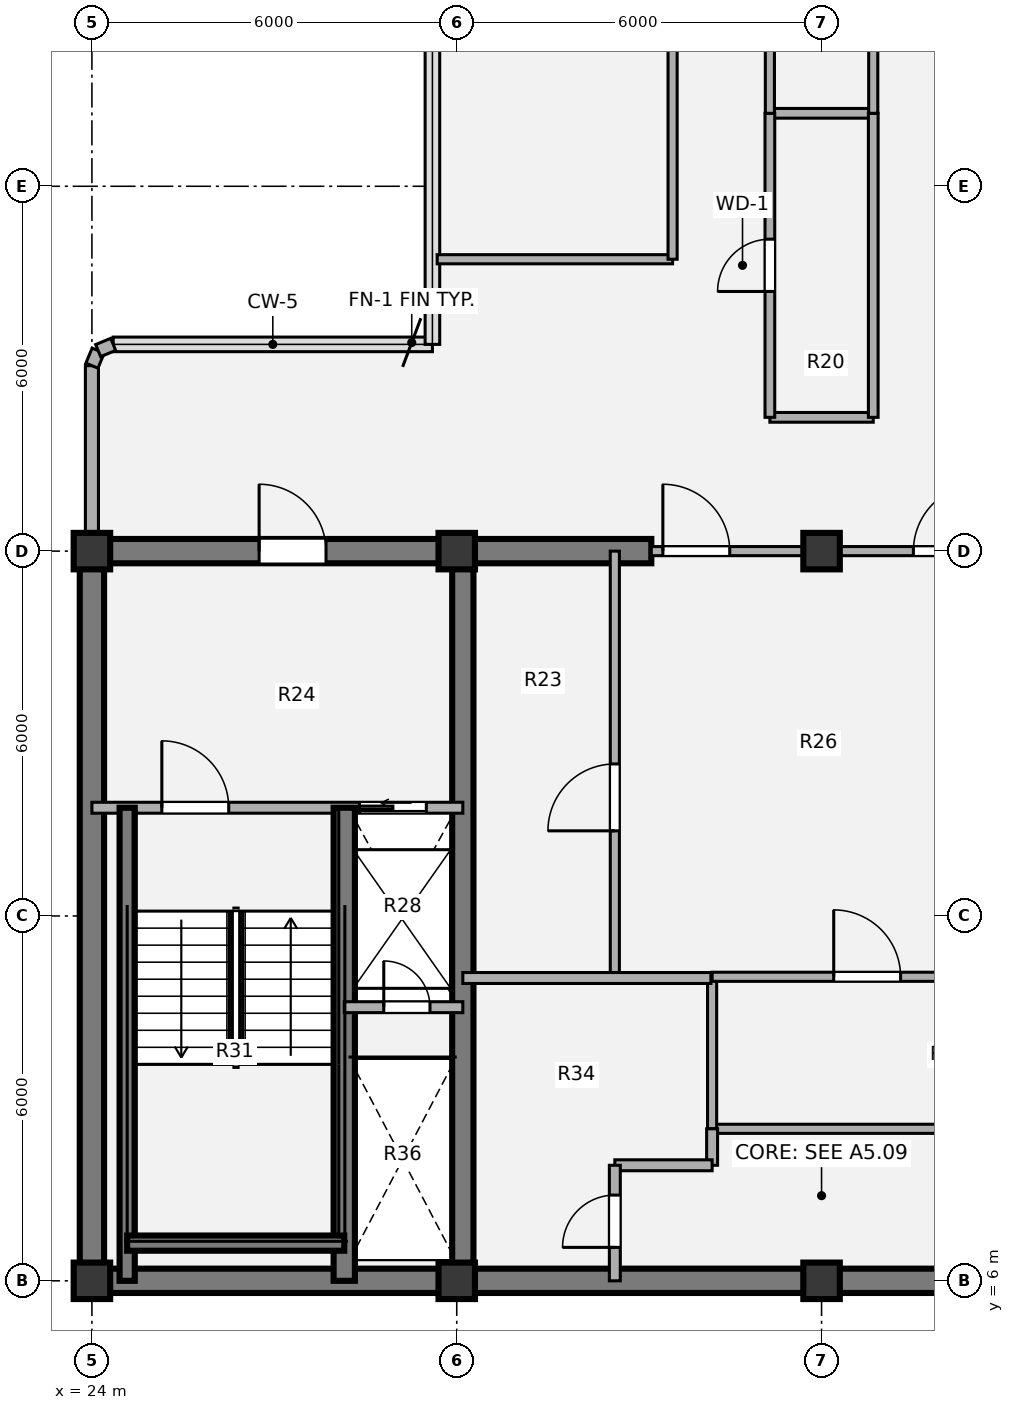
"""IFC4 building model, lengths in metres.
Left out: names, types, materials, properties, quantities, classifications, styles, units other than length and angle.
Written with IfcOpenShell. Run it as: python <this file> out.ifc"""

import sys

from ifc_helpers import new_model, si_unit, direction, frame, frame_2d, origin, origin_2d, place, context, subcontext, project, spatial, rectangle, extrude, source, transform, mapped, element, fill, save


model = new_model("IFC4")
c1 = context("Model", 3, precision=1e-05, world=origin(), true_north=direction((0.0, 1.0)))
c2 = subcontext(c1, "Body", "Model", "MODEL_VIEW")
j1 = project(units=[si_unit("LENGTHUNIT", "METRE"), si_unit("PLANEANGLEUNIT", "RADIAN")], contexts=[c1])
p1 = place(None, origin())
s1 = spatial("IfcSite", under=j1, at=p1, CompositionType="ELEMENT")
p2 = place(p1, origin())
s2 = spatial("IfcBuilding", under=s1, at=p2, CompositionType="ELEMENT")
p3 = place(p2, frame((0.0, 0.0, 272.16)))
s3 = spatial("IfcBuildingStorey", under=s2, at=p3, CompositionType="ELEMENT", Elevation=272.16)
m1 = source(origin(), c2, "Body", "SweptSolid", [
    extrude(rectangle(XDim=0.6, YDim=0.6, at=origin_2d()), origin(), (0.0, 0.0, 1.0), 3.78),
])
for number, where, z_axis, x_axis in (
    (1, (24.0, 6.0, 0.0), (0.0, 0.0, 1.0), (1.0, 0.0, 0.0)),
    (2, (30.0, 6.0, 0.0), (0.0, 0.0, 1.0), (1.0, 0.0, 0.0)),
    (3, (36.0, 6.0, 0.0), (0.0, 0.0, 1.0), (1.0, 0.0, 0.0)),
    (4, (24.0, 18.0, 0.0), (0.0, 0.0, 1.0), (1.0, 0.0, 0.0)),
    (5, (30.0, 18.0, 0.0), (0.0, 0.0, 1.0), (1.0, 0.0, 0.0)),
    (6, (36.0, 18.0, 0.0), (0.0, 0.0, 1.0), (1.0, 0.0, 0.0)),
):
    element("IfcColumn", number, at=place(p3, frame(where, z_axis=z_axis, x_axis=x_axis)), inside=s3, PredefinedType="COLUMN", context=c2, shape_type="MappedRepresentation", body=[
        mapped(m1, transform((0.0, 0.0, 0.0), x_axis=(1.0, 0.0, 0.0), y_axis=(0.0, 1.0, 0.0), z_axis=(0.0, 0.0, 1.0), scale=1.0)),
    ])
p4 = place(p3, frame((48.2, 6.0, 0.0), z_axis=(0.0, 0.0, 1.0), x_axis=(-1.0, 0.0, 0.0)))
e7 = element("IfcWall", 7, at=p4, inside=s3, PredefinedType="SHEAR", context=c2, shape_type="SweptSolid", body=[
    extrude(rectangle(XDim=24.4, YDim=0.4, at=frame_2d((12.2, 0.0))), origin(), (0.0, 0.0, 1.0), 3.78),
])
p5 = place(p3, frame((24.0, 6.0, 0.0), z_axis=(0.0, 0.0, 1.0), x_axis=(0.0, 1.0, 0.0)))
e8 = element("IfcWall", 8, at=p5, inside=s3, PredefinedType="SHEAR", context=c2, shape_type="SweptSolid", body=[
    extrude(rectangle(XDim=12.0, YDim=0.4, at=frame_2d((6.0, 0.0))), origin(), (0.0, 0.0, 1.0), 3.78),
])
p6 = place(p3, frame((23.8, 18.0, 0.0), z_axis=(0.0, 0.0, 1.0), x_axis=(1.0, 0.0, 0.0)))
e9 = element("IfcWall", 9, at=p6, inside=s3, PredefinedType="SHEAR", context=c2, shape_type="SweptSolid", body=[
    extrude(rectangle(XDim=9.4, YDim=0.4, at=frame_2d((4.7, 0.0))), origin(), (0.0, 0.0, 1.0), 3.78),
])
p7 = place(p6, frame((2.95, 0.0, 0.0)))
e10 = element("IfcOpeningElement", 10, at=p7, cuts=e9, PredefinedType="OPENING", context=c2, shape_type="SweptSolid", body=[
    extrude(rectangle(XDim=1.1, YDim=2.1, at=origin_2d()), frame((0.55, 0.21, 1.05), z_axis=(0.0, -1.0, 0.0), x_axis=(1.0, 0.0, 0.0)), (0.0, 0.0, 1.0), 0.42),
])
p8 = place(p3, frame((30.1, 6.0, 0.0), z_axis=(0.0, 0.0, 1.0), x_axis=(0.0, 1.0, 0.0)))
e11 = element("IfcWall", 11, at=p8, inside=s3, PredefinedType="SHEAR", context=c2, shape_type="SweptSolid", body=[
    extrude(rectangle(XDim=12.0, YDim=0.35, at=frame_2d((6.0, 0.0))), origin(), (0.0, 0.0, 1.0), 3.78),
])
p9 = place(p3, frame((24.0, 18.28, 0.0), z_axis=(0.0, 0.0, 1.0), x_axis=(0.0, 1.0, 0.0)))
e12 = element("IfcWall", 12, at=p9, inside=s3, PredefinedType="SOLIDWALL", context=c2, shape_type="SweptSolid", body=[
    extrude(rectangle(XDim=2.77, YDim=0.215, at=frame_2d((1.385, 0.0))), origin(), (0.0, 0.0, 1.0), 2.718),
])
p10 = place(p3, frame((24.0, 21.05, 0.0), z_axis=(0.0, 0.0, 1.0), x_axis=(0.382673670509, 0.923883575944, 0.0)))
e13 = element("IfcWall", 13, at=p10, inside=s3, PredefinedType="SOLIDWALL", context=c2, shape_type="SweptSolid", body=[
    extrude(rectangle(XDim=0.268, YDim=0.215, at=frame_2d((0.134, 0.0))), origin(), (0.0, 0.0, 1.0), 3.53),
])
p11 = place(p3, frame((24.103, 21.298, 0.0), z_axis=(0.0, 0.0, 1.0), x_axis=(0.924205486139, 0.381895560841, 0.0)))
e14 = element("IfcWall", 14, at=p11, inside=s3, PredefinedType="SOLIDWALL", context=c2, shape_type="SweptSolid", body=[
    extrude(rectangle(XDim=0.268, YDim=0.215, at=frame_2d((0.134, 0.0))), origin(), (0.0, 0.0, 1.0), 3.53),
])
p12 = place(p3, frame((32.6, 11.0, 0.0), z_axis=(0.0, 0.0, 1.0), x_axis=(0.0, 1.0, 0.0)))
e15 = element("IfcWall", 15, at=p12, inside=s3, PredefinedType="PARTITIONING", context=c2, shape_type="SweptSolid", body=[
    extrude(rectangle(XDim=7.0, YDim=0.15, at=frame_2d((3.5, 0.0))), origin(), (0.0, 0.0, 1.0), 3.5),
])
p13 = place(p12, frame((2.4, 0.0, 0.0)))
e16 = element("IfcOpeningElement", 16, at=p13, cuts=e15, PredefinedType="OPENING", context=c2, shape_type="SweptSolid", body=[
    extrude(rectangle(XDim=1.1, YDim=2.1, at=origin_2d()), frame((0.55, 0.085, 1.05), z_axis=(0.0, -1.0, 0.0), x_axis=(1.0, 0.0, 0.0)), (0.0, 0.0, 1.0), 0.17),
])
p14 = place(p3, frame((34.2, 8.5, 0.0), z_axis=(0.0, 0.0, 1.0), x_axis=(1.0, 0.0, 0.0)))
e17 = element("IfcWall", 17, at=p14, inside=s3, PredefinedType="PARTITIONING", context=c2, shape_type="SweptSolid", body=[
    extrude(rectangle(XDim=5.15, YDim=0.15, at=frame_2d((2.575, 0.0))), origin(), (0.0, 0.0, 1.0), 3.5),
])
p15 = place(p3, frame((34.2, 8.5, 0.0), z_axis=(0.0, 0.0, 1.0), x_axis=(0.0, 1.0, 0.0)))
e18 = element("IfcWall", 18, at=p15, inside=s3, PredefinedType="PARTITIONING", context=c2, shape_type="SweptSolid", body=[
    extrude(rectangle(XDim=2.5, YDim=0.15, at=frame_2d((1.25, 0.0))), origin(), (0.0, 0.0, 1.0), 3.5),
])
p16 = place(p3, frame((34.2, 11.0, 0.0), z_axis=(0.0, 0.0, 1.0), x_axis=(1.0, 0.0, 0.0)))
e19 = element("IfcWall", 19, at=p16, inside=s3, PredefinedType="PARTITIONING", context=c2, shape_type="SweptSolid", body=[
    extrude(rectangle(XDim=5.15, YDim=0.15, at=frame_2d((2.575, 0.0))), origin(), (0.0, 0.0, 1.0), 3.5),
])
p17 = place(p16, frame((2.0, 0.0, 0.0)))
e20 = element("IfcOpeningElement", 20, at=p17, cuts=e19, PredefinedType="OPENING", context=c2, shape_type="SweptSolid", body=[
    extrude(rectangle(XDim=1.1, YDim=2.1, at=origin_2d()), frame((0.55, 0.085, 1.05), z_axis=(0.0, -1.0, 0.0), x_axis=(1.0, 0.0, 0.0)), (0.0, 0.0, 1.0), 0.17),
])
p18 = place(p3, frame((30.1, 10.98, 0.0), z_axis=(0.0, 0.0, 1.0), x_axis=(1.0, 0.0, 0.0)))
e21 = element("IfcWall", 21, at=p18, inside=s3, PredefinedType="PARTITIONING", context=c2, shape_type="SweptSolid", body=[
    extrude(rectangle(XDim=4.08, YDim=0.18, at=frame_2d((2.04, 0.0))), origin(), (0.0, 0.0, 1.0), 3.5),
])
p19 = place(p3, frame((34.2, 7.9, 0.0), z_axis=(0.0, 0.0, 1.0), x_axis=(0.0, 1.0, 0.0)))
e22 = element("IfcWall", 22, at=p19, inside=s3, PredefinedType="PARTITIONING", context=c2, shape_type="SweptSolid", body=[
    extrude(rectangle(XDim=0.6, YDim=0.18, at=frame_2d((0.3, 0.0))), origin(), (0.0, 0.0, 1.0), 3.5),
])
p20 = place(p3, frame((32.6, 7.9, 0.0), z_axis=(0.0, 0.0, 1.0), x_axis=(1.0, 0.0, 0.0)))
e23 = element("IfcWall", 23, at=p20, inside=s3, PredefinedType="PARTITIONING", context=c2, shape_type="SweptSolid", body=[
    extrude(rectangle(XDim=1.6, YDim=0.18, at=frame_2d((0.8, 0.0))), origin(), (0.0, 0.0, 1.0), 3.5),
])
p21 = place(p3, frame((32.6, 6.0, 0.0), z_axis=(0.0, 0.0, 1.0), x_axis=(0.0, 1.0, 0.0)))
e24 = element("IfcWall", 24, at=p21, inside=s3, PredefinedType="PARTITIONING", context=c2, shape_type="SweptSolid", body=[
    extrude(rectangle(XDim=1.9, YDim=0.18, at=frame_2d((0.95, 0.0))), origin(), (0.0, 0.0, 1.0), 3.5),
])
p22 = place(p21, frame((0.55, 0.0, 0.0)))
e25 = element("IfcOpeningElement", 25, at=p22, cuts=e24, PredefinedType="OPENING", context=c2, shape_type="SweptSolid", body=[
    extrude(rectangle(XDim=0.86, YDim=2.1, at=origin_2d()), frame((0.43, 0.1, 1.05), z_axis=(0.0, -1.0, 0.0), x_axis=(1.0, 0.0, 0.0)), (0.0, 0.0, 1.0), 0.2),
])
p23 = place(p3, frame((33.2, 18.0, 0.0), z_axis=(0.0, 0.0, 1.0), x_axis=(1.0, 0.0, 0.0)))
e26 = element("IfcWall", 26, at=p23, inside=s3, PredefinedType="PARTITIONING", context=c2, shape_type="SweptSolid", body=[
    extrude(rectangle(XDim=5.6, YDim=0.15, at=frame_2d((2.8, 0.0))), origin(), (0.0, 0.0, 1.0), 2.515),
])
p24 = place(p23, frame((0.19, 0.0, 0.0)))
e27 = element("IfcOpeningElement", 27, at=p24, cuts=e26, PredefinedType="OPENING", context=c2, shape_type="SweptSolid", body=[
    extrude(rectangle(XDim=1.1, YDim=2.1, at=origin_2d()), frame((0.55, 0.085, 1.05), z_axis=(0.0, -1.0, 0.0), x_axis=(1.0, 0.0, 0.0)), (0.0, 0.0, 1.0), 0.17),
])
p25 = place(p23, frame((4.31, 0.0, 0.0)))
e28 = element("IfcOpeningElement", 28, at=p25, cuts=e26, PredefinedType="OPENING", context=c2, shape_type="SweptSolid", body=[
    extrude(rectangle(XDim=1.1, YDim=2.1, at=origin_2d()), frame((0.55, 0.085, 1.05), z_axis=(0.0, -1.0, 0.0), x_axis=(1.0, 0.0, 0.0)), (0.0, 0.0, 1.0), 0.17),
])
p26 = place(p3, frame((24.0, 13.78, 0.0), z_axis=(0.0, 0.0, 1.0), x_axis=(1.0, 0.0, 0.0)))
e29 = element("IfcWall", 29, at=p26, inside=s3, PredefinedType="PARTITIONING", context=c2, shape_type="SweptSolid", body=[
    extrude(rectangle(XDim=6.1, YDim=0.18, at=frame_2d((3.05, 0.0))), origin(), (0.0, 0.0, 1.0), 3.5),
])
p27 = place(p26, frame((1.15, 0.0, 0.0)))
e30 = element("IfcOpeningElement", 30, at=p27, cuts=e29, PredefinedType="OPENING", context=c2, shape_type="SweptSolid", body=[
    extrude(rectangle(XDim=1.1, YDim=2.1, at=origin_2d()), frame((0.55, 0.1, 1.05), z_axis=(0.0, -1.0, 0.0), x_axis=(1.0, 0.0, 0.0)), (0.0, 0.0, 1.0), 0.2),
])
p28 = place(p26, frame((4.4, 0.0, 0.0)))
e31 = element("IfcOpeningElement", 31, at=p28, cuts=e29, PredefinedType="OPENING", context=c2, shape_type="SweptSolid", body=[
    extrude(rectangle(XDim=1.1, YDim=2.1, at=origin_2d()), frame((0.55, 0.1, 1.05), z_axis=(0.0, -1.0, 0.0), x_axis=(1.0, 0.0, 0.0)), (0.0, 0.0, 1.0), 0.2),
])
p29 = place(p3, frame((28.15, 6.0, 0.0), z_axis=(0.0, 0.0, 1.0), x_axis=(0.0, 1.0, 0.0)))
e32 = element("IfcWall", 32, at=p29, inside=s3, PredefinedType="SHEAR", context=c2, shape_type="SweptSolid", body=[
    extrude(rectangle(XDim=7.78, YDim=0.35, at=frame_2d((3.89, 0.0))), origin(), (0.0, 0.0, 1.0), 3.85),
])
p30 = place(p3, frame((24.58, 6.0, 0.0), z_axis=(0.0, 0.0, 1.0), x_axis=(0.0, 1.0, 0.0)))
e33 = element("IfcWall", 33, at=p30, inside=s3, PredefinedType="SHEAR", context=c2, shape_type="SweptSolid", body=[
    extrude(rectangle(XDim=7.78, YDim=0.25, at=frame_2d((3.89, 0.0))), origin(), (0.0, 0.0, 1.0), 3.85),
])
p31 = place(p3, frame((24.58, 6.62, 0.0), z_axis=(0.0, 0.0, 1.0), x_axis=(1.0, 0.0, 0.0)))
e34 = element("IfcWall", 34, at=p31, inside=s3, PredefinedType="SHEAR", context=c2, shape_type="SweptSolid", body=[
    extrude(rectangle(XDim=3.57, YDim=0.25, at=frame_2d((1.785, 0.0))), origin(), (0.0, 0.0, 1.0), 3.85),
])
p32 = place(p3, frame((28.15, 10.5, 0.0), z_axis=(0.0, 0.0, 1.0), x_axis=(1.0, 0.0, 0.0)))
e35 = element("IfcWall", 35, at=p32, inside=s3, PredefinedType="PARTITIONING", context=c2, shape_type="SweptSolid", body=[
    extrude(rectangle(XDim=1.95, YDim=0.18, at=frame_2d((0.975, 0.0))), origin(), (0.0, 0.0, 1.0), 3.5),
])
p33 = place(p32, frame((0.65, 0.0, 0.0)))
e36 = element("IfcOpeningElement", 36, at=p33, cuts=e35, PredefinedType="OPENING", context=c2, shape_type="SweptSolid", body=[
    extrude(rectangle(XDim=0.76, YDim=2.05, at=origin_2d()), frame((0.38, 0.1, 1.025), z_axis=(0.0, -1.0, 0.0), x_axis=(1.0, 0.0, 0.0)), (0.0, 0.0, 1.0), 0.2),
])
p34 = place(p3, frame((35.15, 20.2, 0.0), z_axis=(0.0, 0.0, 1.0), x_axis=(1.0, 0.0, 0.0)))
e37 = element("IfcWall", 37, at=p34, inside=s3, PredefinedType="PLUMBINGWALL", context=c2, shape_type="SweptSolid", body=[
    extrude(rectangle(XDim=1.7, YDim=0.16, at=frame_2d((0.85, 0.0))), origin(), (0.0, 0.0, 1.0), 3.5),
])
p35 = place(p3, frame((29.678, 22.8, 0.0), z_axis=(0.0, 0.0, 1.0), x_axis=(1.0, 0.0, 0.0)))
e38 = element("IfcWall", 38, at=p35, inside=s3, PredefinedType="PARTITIONING", context=c2, shape_type="SweptSolid", body=[
    extrude(rectangle(XDim=3.872, YDim=0.15, at=frame_2d((1.936, 0.0))), origin(), (0.0, 0.0, 1.0), 3.5),
])
p36 = place(p3, frame((35.15, 25.2, 0.0), z_axis=(0.0, 0.0, 1.0), x_axis=(1.0, 0.0, 0.0)))
e39 = element("IfcWall", 39, at=p36, inside=s3, PredefinedType="PLUMBINGWALL", context=c2, shape_type="SweptSolid", body=[
    extrude(rectangle(XDim=1.7, YDim=0.16, at=frame_2d((0.85, 0.0))), origin(), (0.0, 0.0, 1.0), 3.5),
])
p37 = place(p3, frame((33.55, 22.8, 0.0), z_axis=(0.0, 0.0, 1.0), x_axis=(0.0, 1.0, 0.0)))
e40 = element("IfcWall", 40, at=p37, inside=s3, PredefinedType="PARTITIONING", context=c2, shape_type="SweptSolid", body=[
    extrude(rectangle(XDim=18.8, YDim=0.15, at=frame_2d((9.4, 0.0))), origin(), (0.0, 0.0, 1.0), 3.5),
])
p38 = place(p37, frame((8.84, 0.0, 0.0)))
e41 = element("IfcOpeningElement", 41, at=p38, cuts=e40, PredefinedType="OPENING", context=c2, shape_type="SweptSolid", body=[
    extrude(rectangle(XDim=0.86, YDim=2.1, at=origin_2d()), frame((0.43, 0.085, 1.05), z_axis=(0.0, -1.0, 0.0), x_axis=(1.0, 0.0, 0.0)), (0.0, 0.0, 1.0), 0.17),
])
p39 = place(p3, frame((35.15, 20.2, 0.0), z_axis=(0.0, 0.0, 1.0), x_axis=(0.0, 1.0, 0.0)))
e42 = element("IfcWall", 42, at=p39, inside=s3, PredefinedType="PLUMBINGWALL", context=c2, shape_type="SweptSolid", body=[
    extrude(rectangle(XDim=5.0, YDim=0.16, at=frame_2d((2.5, 0.0))), origin(), (0.0, 0.0, 1.0), 3.5),
])
p40 = place(p39, frame((2.07, 0.0, 0.0)))
e43 = element("IfcOpeningElement", 43, at=p40, cuts=e42, PredefinedType="OPENING", context=c2, shape_type="SweptSolid", body=[
    extrude(rectangle(XDim=0.86, YDim=2.1, at=origin_2d()), frame((0.43, 0.09, 1.05), z_axis=(0.0, -1.0, 0.0), x_axis=(1.0, 0.0, 0.0)), (0.0, 0.0, 1.0), 0.18),
])
p41 = place(p3, frame((35.15, 25.2, 0.0), z_axis=(0.0, 0.0, 1.0), x_axis=(0.0, 1.0, 0.0)))
e44 = element("IfcWall", 44, at=p41, inside=s3, PredefinedType="PARTITIONING", context=c2, shape_type="SweptSolid", body=[
    extrude(rectangle(XDim=19.42, YDim=0.15, at=frame_2d((9.71, 0.0))), origin(), (0.0, 0.0, 1.0), 3.5),
])
p42 = place(p3, frame((36.85, 20.2, 0.0), z_axis=(0.0, 0.0, 1.0), x_axis=(0.0, 1.0, 0.0)))
e45 = element("IfcWall", 45, at=p42, inside=s3, PredefinedType="PLUMBINGWALL", context=c2, shape_type="SweptSolid", body=[
    extrude(rectangle(XDim=5.0, YDim=0.16, at=frame_2d((2.5, 0.0))), origin(), (0.0, 0.0, 1.0), 3.5),
])
p43 = place(p3, frame((36.85, 25.2, 0.0), z_axis=(0.0, 0.0, 1.0), x_axis=(0.0, 1.0, 0.0)))
e46 = element("IfcWall", 46, at=p43, inside=s3, PredefinedType="PARTITIONING", context=c2, shape_type="SweptSolid", body=[
    extrude(rectangle(XDim=19.42, YDim=0.15, at=frame_2d((9.71, 0.0))), origin(), (0.0, 0.0, 1.0), 3.5),
])
p44 = place(p43, frame((9.185, 0.0, 0.0)))
e47 = element("IfcOpeningElement", 47, at=p44, cuts=e46, PredefinedType="OPENING", context=c2, shape_type="SweptSolid", body=[
    extrude(rectangle(XDim=1.05, YDim=2.1, at=origin_2d()), frame((0.525, 0.085, 1.05), z_axis=(0.0, -1.0, 0.0), x_axis=(1.0, 0.0, 0.0)), (0.0, 0.0, 1.0), 0.17),
])
m2 = source(origin(), c2, "Body", "SweptSolid", [
    extrude(rectangle(XDim=1.1, YDim=2.1, at=origin_2d()), frame((0.55, 0.025, 1.05), z_axis=(0.0, -1.0, 0.0), x_axis=(1.0, 0.0, 0.0)), (0.0, 0.0, 1.0), 0.05),
])
p45 = place(p13, origin())
e48 = element("IfcDoor", 48, at=p45, inside=s3, OperationType="SINGLE_SWING_LEFT", PredefinedType="DOOR", context=c2, shape_type="MappedRepresentation", body=[
    mapped(m2, transform((0.0, 0.0, 0.0), x_axis=(1.0, 0.0, 0.0), y_axis=(0.0, 1.0, 0.0), z_axis=(0.0, 0.0, 1.0), scale=1.0)),
])
fill(e16, e48)
p46 = place(p17, origin())
e49 = element("IfcDoor", 49, at=p46, inside=s3, OperationType="SINGLE_SWING_LEFT", PredefinedType="DOOR", context=c2, shape_type="MappedRepresentation", body=[
    mapped(m2, transform((0.0, 0.0, 0.0), x_axis=(1.0, 0.0, 0.0), y_axis=(0.0, 1.0, 0.0), z_axis=(0.0, 0.0, 1.0), scale=1.0)),
])
fill(e20, e49)
m3 = source(origin(), c2, "Body", "SweptSolid", [
    extrude(rectangle(XDim=0.86, YDim=2.1, at=origin_2d()), frame((0.43, 0.025, 1.05), z_axis=(0.0, -1.0, 0.0), x_axis=(1.0, 0.0, 0.0)), (0.0, 0.0, 1.0), 0.05),
])
p47 = place(p22, origin())
e50 = element("IfcDoor", 50, at=p47, inside=s3, OperationType="SINGLE_SWING_LEFT", PredefinedType="DOOR", context=c2, shape_type="MappedRepresentation", body=[
    mapped(m3, transform((0.0, 0.0, 0.0), x_axis=(1.0, 0.0, 0.0), y_axis=(0.0, 1.0, 0.0), z_axis=(0.0, 0.0, 1.0), scale=1.0)),
])
fill(e25, e50)
m4 = source(origin(), c2, "Body", "SweptSolid", [
    extrude(rectangle(XDim=1.1, YDim=2.1, at=origin_2d()), frame((0.55, 0.025, 1.05), z_axis=(0.0, -1.0, 0.0), x_axis=(1.0, 0.0, 0.0)), (0.0, 0.0, 1.0), 0.05),
])
p48 = place(p24, origin())
e51 = element("IfcDoor", 51, at=p48, inside=s3, OperationType="SINGLE_SWING_LEFT", PredefinedType="DOOR", context=c2, shape_type="MappedRepresentation", body=[
    mapped(m4, transform((0.0, 0.0, 0.0), x_axis=(1.0, 0.0, 0.0), y_axis=(0.0, 1.0, 0.0), z_axis=(0.0, 0.0, 1.0), scale=1.0)),
])
fill(e27, e51)
p49 = place(p25, origin())
e52 = element("IfcDoor", 52, at=p49, inside=s3, OperationType="SINGLE_SWING_RIGHT", PredefinedType="DOOR", context=c2, shape_type="MappedRepresentation", body=[
    mapped(m4, transform((0.0, 0.0, 0.0), x_axis=(1.0, 0.0, 0.0), y_axis=(0.0, 1.0, 0.0), z_axis=(0.0, 0.0, 1.0), scale=1.0)),
])
fill(e28, e52)
m5 = source(origin(), c2, "Body", "SweptSolid", [
    extrude(rectangle(XDim=1.1, YDim=2.1, at=origin_2d()), frame((0.55, 0.025, 1.05), z_axis=(0.0, -1.0, 0.0), x_axis=(1.0, 0.0, 0.0)), (0.0, 0.0, 1.0), 0.05),
])
p50 = place(p27, origin())
e53 = element("IfcDoor", 53, at=p50, inside=s3, OperationType="SINGLE_SWING_LEFT", PredefinedType="DOOR", context=c2, shape_type="MappedRepresentation", body=[
    mapped(m5, transform((0.0, 0.0, 0.0), x_axis=(1.0, 0.0, 0.0), y_axis=(0.0, 1.0, 0.0), z_axis=(0.0, 0.0, 1.0), scale=1.0)),
])
fill(e30, e53)
m6 = source(origin(), c2, "Body", "SweptSolid", [
    extrude(rectangle(XDim=1.1, YDim=2.1, at=origin_2d()), frame((0.55, 0.025, 1.05), z_axis=(0.0, -1.0, 0.0), x_axis=(1.0, 0.0, 0.0)), (0.0, 0.0, 1.0), 0.05),
])
p51 = place(p28, origin())
e54 = element("IfcDoor", 54, at=p51, inside=s3, OperationType="SLIDING_TO_LEFT", PredefinedType="DOOR", context=c2, shape_type="MappedRepresentation", body=[
    mapped(m6, transform((0.0, 0.0, 0.0), x_axis=(1.0, 0.0, 0.0), y_axis=(0.0, 1.0, 0.0), z_axis=(0.0, 0.0, 1.0), scale=1.0)),
])
fill(e31, e54)
m7 = source(origin(), c2, "Body", "SweptSolid", [
    extrude(rectangle(XDim=0.76, YDim=2.05, at=origin_2d()), frame((0.38, 0.025, 1.025), z_axis=(0.0, -1.0, 0.0), x_axis=(1.0, 0.0, 0.0)), (0.0, 0.0, 1.0), 0.05),
])
p52 = place(p33, origin())
e55 = element("IfcDoor", 55, at=p52, inside=s3, OperationType="SINGLE_SWING_LEFT", PredefinedType="DOOR", context=c2, shape_type="MappedRepresentation", body=[
    mapped(m7, transform((0.0, 0.0, 0.0), x_axis=(1.0, 0.0, 0.0), y_axis=(0.0, 1.0, 0.0), z_axis=(0.0, 0.0, 1.0), scale=1.0)),
])
fill(e36, e55)
p53 = place(p7, origin())
e56 = element("IfcDoor", 56, at=p53, inside=s3, OperationType="SINGLE_SWING_LEFT", PredefinedType="DOOR", context=c2, shape_type="MappedRepresentation", body=[
    mapped(m4, transform((0.0, 0.0, 0.0), x_axis=(1.0, 0.0, 0.0), y_axis=(0.0, 1.0, 0.0), z_axis=(0.0, 0.0, 1.0), scale=1.0)),
])
fill(e10, e56)
m8 = source(origin(), c2, "Body", "SweptSolid", [
    extrude(rectangle(XDim=0.86, YDim=2.1, at=origin_2d()), frame((0.43, 0.025, 1.05), z_axis=(0.0, -1.0, 0.0), x_axis=(1.0, 0.0, 0.0)), (0.0, 0.0, 1.0), 0.05),
])
p54 = place(p40, origin())
e57 = element("IfcDoor", 57, at=p54, inside=s3, OperationType="SINGLE_SWING_LEFT", PredefinedType="DOOR", context=c2, shape_type="MappedRepresentation", body=[
    mapped(m8, transform((0.0, 0.0, 0.0), x_axis=(1.0, 0.0, 0.0), y_axis=(0.0, 1.0, 0.0), z_axis=(0.0, 0.0, 1.0), scale=1.0)),
])
fill(e43, e57)
save(model, sys.argv[1])
